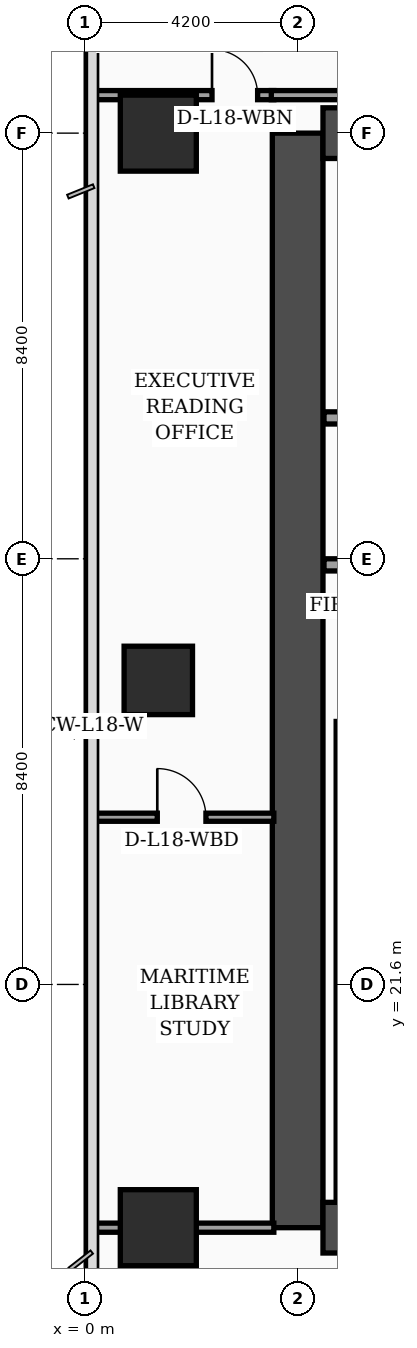
"""IFC4 building model, lengths in metres.
Left out: names, types, materials, properties, quantities, classifications, styles, units other than length and angle.
Written with IfcOpenShell. Run it as: python <this file> out.ifc"""

import sys

from ifc_helpers import new_model, si_unit, direction, frame, frame_2d, origin, origin_2d, place, context, subcontext, project, spatial, rectangle, extrude, element, fill, save


model = new_model("IFC4")
c1 = context("Model", 3, precision=1e-05, world=origin(), true_north=direction((0.0, 1.0)))
c2 = subcontext(c1, "Body", "Model", "MODEL_VIEW")
j1 = project(units=[si_unit("LENGTHUNIT", "METRE"), si_unit("PLANEANGLEUNIT", "RADIAN")], contexts=[c1])
p1 = place(None, origin())
s1 = spatial("IfcSite", under=j1, at=p1, CompositionType="ELEMENT")
p2 = place(p1, origin())
s2 = spatial("IfcBuilding", under=s1, at=p2, CompositionType="ELEMENT")
p3 = place(p2, frame((0.0, 0.0, 77.4)))
s3 = spatial("IfcBuildingStorey", under=s2, at=p3, CompositionType="ELEMENT", Elevation=77.4)
p4 = place(p3, frame((4.2, 16.8, 0.0), z_axis=(0.0, 0.0, 1.0), x_axis=(0.0, 1.0, 0.0)))
e1 = element("IfcWall", 1, at=p4, inside=s3, PredefinedType="SHEAR", context=c2, shape_type="SweptSolid", body=[
    extrude(rectangle(XDim=21.6, YDim=1.0, at=frame_2d((10.8, 0.0))), origin(), (0.0, 0.0, 1.0), 3.56),
])
for number, where, z_axis, x_axis in (
    (2, (4.7, 38.4, 0.0), (0.0, 0.0, 1.0), (1.0, 0.0, 0.0)),
    (3, (4.7, 16.8, 0.0), (0.0, 0.0, 1.0), (1.0, 0.0, 0.0)),
):
    element("IfcWall", number, at=place(p3, frame(where, z_axis=z_axis, x_axis=x_axis)), inside=s3, PredefinedType="SHEAR", context=c2, shape_type="SweptSolid", body=[
        extrude(rectangle(XDim=9.8, YDim=1.0, at=frame_2d((4.9, 0.0))), origin(), (0.0, 0.0, 1.0), 3.56),
    ])
p5 = place(p3, frame((5.08, 17.3, 0.0), z_axis=(0.0, 0.0, 1.0), x_axis=(0.0, 1.0, 0.0)))
e4 = element("IfcWall", 4, at=p5, inside=s3, PredefinedType="SOLIDWALL", context=c2, shape_type="SweptSolid", body=[
    extrude(rectangle(XDim=9.49, YDim=0.24, at=frame_2d((4.745, 0.0))), origin(), (0.0, 0.0, 1.0), 3.56),
])
p6 = place(p3, frame((1.45, 16.8, 0.0), z_axis=(0.0, 0.0, 1.0), x_axis=(1.0, 0.0, 0.0)))
e5 = element("IfcColumn", 5, at=p6, inside=s3, PredefinedType="COLUMN", context=c2, shape_type="SweptSolid", body=[
    extrude(rectangle(XDim=1.5, YDim=1.5, at=origin_2d()), origin(), (0.0, 0.0, 1.0), 3.56),
])
p7 = place(p3, frame((1.45, 27.6, 0.0), z_axis=(0.0, 0.0, 1.0), x_axis=(1.0, 0.0, 0.0)))
e6 = element("IfcColumn", 6, at=p7, inside=s3, PredefinedType="COLUMN", context=c2, shape_type="SweptSolid", body=[
    extrude(rectangle(XDim=1.35, YDim=1.35, at=origin_2d()), origin(), (0.0, 0.0, 1.0), 3.56),
])
p8 = place(p3, frame((1.45, 38.4, 0.0), z_axis=(0.0, 0.0, 1.0), x_axis=(1.0, 0.0, 0.0)))
e7 = element("IfcColumn", 7, at=p8, inside=s3, PredefinedType="COLUMN", context=c2, shape_type="SweptSolid", body=[
    extrude(rectangle(XDim=1.5, YDim=1.5, at=origin_2d()), origin(), (0.0, 0.0, 1.0), 3.56),
])
p9 = place(p3, frame((4.72, 29.88, 0.0), z_axis=(0.0, 0.0, 1.0), x_axis=(1.0, 0.0, 0.0)))
e8 = element("IfcWall", 8, at=p9, inside=s3, PredefinedType="SOLIDWALL", context=c2, shape_type="SweptSolid", body=[
    extrude(rectangle(XDim=4.7, YDim=0.24, at=frame_2d((2.35, 0.0))), origin(), (0.0, 0.0, 1.0), 3.56),
])
p10 = place(p9, frame((0.45, 0.0, 0.0)))
e9 = element("IfcOpeningElement", 9, at=p10, cuts=e8, PredefinedType="OPENING", context=c2, shape_type="SweptSolid", body=[
    extrude(rectangle(XDim=1.3, YDim=2.35, at=frame_2d((0.65, 1.175))), frame((0.0, 0.13, 0.0), z_axis=(0.0, -1.0, 0.0), x_axis=(1.0, 0.0, 0.0)), (0.0, 0.0, 1.0), 0.26),
])
p11 = place(p3, frame((4.72, 32.78, 0.0), z_axis=(0.0, 0.0, 1.0), x_axis=(1.0, 0.0, 0.0)))
e10 = element("IfcWall", 10, at=p11, inside=s3, PredefinedType="SOLIDWALL", context=c2, shape_type="SweptSolid", body=[
    extrude(rectangle(XDim=4.7, YDim=0.24, at=frame_2d((2.35, 0.0))), origin(), (0.0, 0.0, 1.0), 3.56),
])
p12 = place(p3, frame((0.08, 24.9, 0.0), z_axis=(0.0, 0.0, 1.0), x_axis=(1.0, 0.0, 0.0)))
e11 = element("IfcWall", 11, at=p12, inside=s3, PredefinedType="PARTITIONING", context=c2, shape_type="SweptSolid", body=[
    extrude(rectangle(XDim=3.65, YDim=0.16, at=frame_2d((1.825, 0.0))), origin(), (0.0, 0.0, 1.0), 3.04),
])
p13 = place(p12, frame((1.35, 0.0, 0.0)))
e12 = element("IfcOpeningElement", 12, at=p13, cuts=e11, PredefinedType="OPENING", context=c2, shape_type="SweptSolid", body=[
    extrude(rectangle(XDim=0.96, YDim=2.2, at=frame_2d((0.48, 1.1))), frame((0.0, 0.09, 0.0), z_axis=(0.0, -1.0, 0.0), x_axis=(1.0, 0.0, 0.0)), (0.0, 0.0, 1.0), 0.18),
])
p14 = place(p3, frame((0.08, 16.8, 0.0), z_axis=(0.0, 0.0, 1.0), x_axis=(1.0, 0.0, 0.0)))
e13 = element("IfcWall", 13, at=p14, inside=s3, PredefinedType="PARTITIONING", context=c2, shape_type="SweptSolid", body=[
    extrude(rectangle(XDim=3.65, YDim=0.18, at=frame_2d((1.825, 0.0))), origin(), (0.0, 0.0, 1.0), 2.84),
])
p15 = place(p3, frame((0.08, 39.15, 0.0), z_axis=(0.0, 0.0, 1.0), x_axis=(1.0, 0.0, 0.0)))
e14 = element("IfcWall", 14, at=p15, inside=s3, PredefinedType="PARTITIONING", context=c2, shape_type="SweptSolid", body=[
    extrude(rectangle(XDim=3.65, YDim=0.18, at=frame_2d((1.825, 0.0))), origin(), (0.0, 0.0, 1.0), 2.84),
])
p16 = place(p15, frame((2.43, 0.0, 0.0)))
e15 = element("IfcOpeningElement", 15, at=p16, cuts=e14, PredefinedType="OPENING", context=c2, shape_type="SweptSolid", body=[
    extrude(rectangle(XDim=0.9, YDim=2.15, at=frame_2d((0.45, 1.075))), frame((0.0, 0.1, 0.0), z_axis=(0.0, -1.0, 0.0), x_axis=(1.0, 0.0, 0.0)), (0.0, 0.0, 1.0), 0.2),
])
p17 = place(p3, frame((3.68, 39.15, 0.0), z_axis=(0.0, 0.0, 1.0), x_axis=(1.0, 0.0, 0.0)))
e16 = element("IfcWall", 16, at=p17, inside=s3, PredefinedType="PARTITIONING", context=c2, shape_type="SweptSolid", body=[
    extrude(rectangle(XDim=11.47, YDim=0.18, at=frame_2d((5.735, 0.0))), origin(), (0.0, 0.0, 1.0), 2.84),
])
p18 = place(p13, origin())
e17 = element("IfcDoor", 17, at=p18, inside=s3, OperationType="SINGLE_SWING_LEFT", PredefinedType="DOOR", context=c2, shape_type="SweptSolid", body=[
    extrude(rectangle(XDim=0.96, YDim=2.2, at=frame_2d((0.48, 1.1))), frame((0.0, 0.025, 0.0), z_axis=(0.0, -1.0, 0.0), x_axis=(1.0, 0.0, 0.0)), (0.0, 0.0, 1.0), 0.05),
])
fill(e12, e17)
p19 = place(p16, origin())
e18 = element("IfcDoor", 18, at=p19, inside=s3, OperationType="SINGLE_SWING_LEFT", PredefinedType="DOOR", context=c2, shape_type="SweptSolid", body=[
    extrude(rectangle(XDim=0.9, YDim=2.15, at=frame_2d((0.45, 1.075))), frame((0.0, 0.025, 0.0), z_axis=(0.0, -1.0, 0.0), x_axis=(1.0, 0.0, 0.0)), (0.0, 0.0, 1.0), 0.05),
])
fill(e15, e18)
save(model, sys.argv[1])
